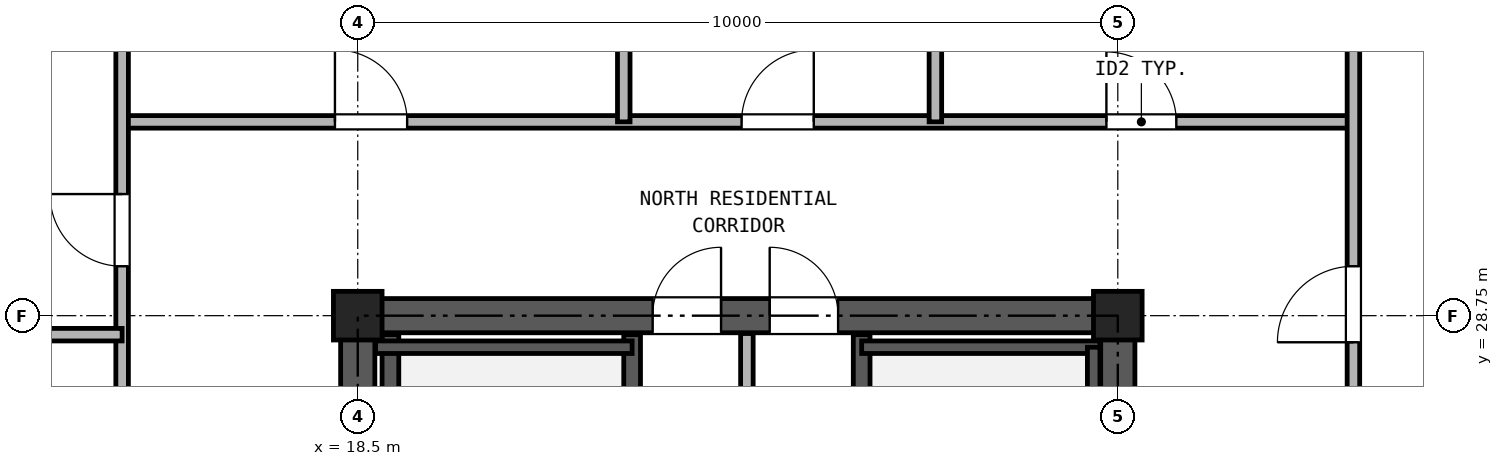
"""IFC4 building model, lengths in metres.
Left out: names, types, materials, properties, quantities, classifications, styles, units other than length and angle.
Written with IfcOpenShell. Run it as: python <this file> out.ifc"""

import sys

from ifc_helpers import new_model, si_unit, direction, frame, frame_2d, origin, origin_2d, place, context, subcontext, project, spatial, rectangle, hollow_rectangle, extrude, source, transform, mapped, element, fill, save


model = new_model("IFC4")
c1 = context("Model", 3, precision=1e-05, world=origin(), true_north=direction((0.0, 1.0)))
c2 = subcontext(c1, "Body", "Model", "MODEL_VIEW")
j1 = project(units=[si_unit("LENGTHUNIT", "METRE"), si_unit("PLANEANGLEUNIT", "RADIAN")], contexts=[c1])
p1 = place(None, origin())
s1 = spatial("IfcSite", under=j1, at=p1, CompositionType="ELEMENT")
p2 = place(p1, origin())
s2 = spatial("IfcBuilding", under=s1, at=p2, CompositionType="ELEMENT")
p3 = place(p2, frame((0.0, 0.0, 175.3)))
s3 = spatial("IfcBuildingStorey", under=s2, at=p3, CompositionType="ELEMENT", Elevation=175.3)
m1 = source(origin(), c2, "Body", "SweptSolid", [
    extrude(hollow_rectangle(XDim=0.64, YDim=0.64, WallThickness=0.035, at=origin_2d()), origin(), (0.0, 0.0, 1.0), 2.95),
])
for number, where, z_axis, x_axis in (
    (1, (18.5, 28.75, 0.0), (0.0, 0.0, 1.0), (1.0, 0.0, 0.0)),
    (2, (28.5, 28.75, 0.0), (0.0, 0.0, 1.0), (1.0, 0.0, 0.0)),
):
    element("IfcColumn", number, at=place(p3, frame(where, z_axis=z_axis, x_axis=x_axis)), inside=s3, PredefinedType="COLUMN", context=c2, shape_type="MappedRepresentation", body=[
        mapped(m1, transform((0.0, 0.0, 0.0), x_axis=(1.0, 0.0, 0.0), y_axis=(0.0, 1.0, 0.0), z_axis=(0.0, 0.0, 1.0), scale=1.0)),
    ])
p4 = place(p3, frame((18.275, 28.75, 0.0), z_axis=(0.0, 0.0, 1.0), x_axis=(1.0, 0.0, 0.0)))
e3 = element("IfcWall", 3, at=p4, inside=s3, PredefinedType="SHEAR", context=c2, shape_type="SweptSolid", body=[
    extrude(rectangle(XDim=10.45, YDim=0.45, at=frame_2d((5.225, 0.0))), origin(), (0.0, 0.0, 1.0), 2.95),
])
p5 = place(p4, frame((4.105, 0.0, 0.0)))
e4 = element("IfcOpeningElement", 4, at=p5, cuts=e3, PredefinedType="OPENING", context=c2, shape_type="SweptSolid", body=[
    extrude(rectangle(XDim=0.9, YDim=2.05, at=frame_2d((0.45, 1.025))), frame((0.0, 0.235, 0.0), z_axis=(0.0, -1.0, 0.0), x_axis=(1.0, 0.0, 0.0)), (0.0, 0.0, 1.0), 0.47),
])
p6 = place(p4, frame((5.645, 0.0, 0.0)))
e5 = element("IfcOpeningElement", 5, at=p6, cuts=e3, PredefinedType="OPENING", context=c2, shape_type="SweptSolid", body=[
    extrude(rectangle(XDim=0.9, YDim=2.05, at=frame_2d((0.45, 1.025))), frame((0.0, 0.235, 0.0), z_axis=(0.0, -1.0, 0.0), x_axis=(1.0, 0.0, 0.0)), (0.0, 0.0, 1.0), 0.47),
])
p7 = place(p3, frame((18.5, 11.725, 0.0), z_axis=(0.0, 0.0, 1.0), x_axis=(0.0, 1.0, 0.0)))
e6 = element("IfcWall", 6, at=p7, inside=s3, PredefinedType="SHEAR", context=c2, shape_type="SweptSolid", body=[
    extrude(rectangle(XDim=16.8, YDim=0.45, at=frame_2d((8.4, 0.0))), origin(), (0.0, 0.0, 1.0), 2.95),
])
p8 = place(p7, frame((7.425, 0.0, 0.0)))
e7 = element("IfcOpeningElement", 7, at=p8, cuts=e6, PredefinedType="OPENING", context=c2, shape_type="SweptSolid", body=[
    extrude(rectangle(XDim=1.15, YDim=2.2, at=frame_2d((0.575, 1.1))), frame((0.0, 0.235, 0.0), z_axis=(0.0, -1.0, 0.0), x_axis=(1.0, 0.0, 0.0)), (0.0, 0.0, 1.0), 0.47),
])
p9 = place(p3, frame((28.5, 11.725, 0.0), z_axis=(0.0, 0.0, 1.0), x_axis=(0.0, 1.0, 0.0)))
e8 = element("IfcWall", 8, at=p9, inside=s3, PredefinedType="SHEAR", context=c2, shape_type="SweptSolid", body=[
    extrude(rectangle(XDim=16.8, YDim=0.45, at=frame_2d((8.4, 0.0))), origin(), (0.0, 0.0, 1.0), 2.95),
])
p10 = place(p9, frame((7.425, 0.0, 0.0)))
e9 = element("IfcOpeningElement", 9, at=p10, cuts=e8, PredefinedType="OPENING", context=c2, shape_type="SweptSolid", body=[
    extrude(rectangle(XDim=1.15, YDim=2.2, at=frame_2d((0.575, 1.1))), frame((0.0, 0.235, 0.0), z_axis=(0.0, -1.0, 0.0), x_axis=(1.0, 0.0, 0.0)), (0.0, 0.0, 1.0), 0.47),
])
for number, where, z_axis, x_axis in (
    (10, (18.93, 21.39, 0.0), (0.0, 0.0, 1.0), (0.0, 1.0, 0.0)),
    (11, (22.11, 21.39, 0.0), (0.0, 0.0, 1.0), (0.0, 1.0, 0.0)),
    (12, (25.13, 21.39, 0.0), (0.0, 0.0, 1.0), (0.0, 1.0, 0.0)),
):
    element("IfcWall", number, at=place(p3, frame(where, z_axis=z_axis, x_axis=x_axis)), inside=s3, PredefinedType="SOLIDWALL", context=c2, shape_type="SweptSolid", body=[
        extrude(rectangle(XDim=7.11, YDim=0.22, at=frame_2d((3.555, 0.0))), origin(), (0.0, 0.0, 1.0), 2.95),
    ])
p11 = place(p3, frame((18.735, 28.335, 0.0), z_axis=(0.0, 0.0, 1.0), x_axis=(1.0, 0.0, 0.0)))
e13 = element("IfcWall", 13, at=p11, inside=s3, PredefinedType="PARTITIONING", context=c2, shape_type="SweptSolid", body=[
    extrude(rectangle(XDim=3.375, YDim=0.165, at=frame_2d((1.688, 0.0))), origin(), (0.0, 0.0, 1.0), 2.95),
])
p12 = place(p3, frame((25.13, 28.335, 0.0), z_axis=(0.0, 0.0, 1.0), x_axis=(1.0, 0.0, 0.0)))
e14 = element("IfcWall", 14, at=p12, inside=s3, PredefinedType="PARTITIONING", context=c2, shape_type="SweptSolid", body=[
    extrude(rectangle(XDim=3.135, YDim=0.165, at=frame_2d((1.567, 0.0))), origin(), (0.0, 0.0, 1.0), 2.95),
])
p13 = place(p3, frame((28.183, 21.39, 0.0), z_axis=(0.0, 0.0, 1.0), x_axis=(0.0, 1.0, 0.0)))
e15 = element("IfcWall", 15, at=p13, inside=s3, PredefinedType="PARTITIONING", context=c2, shape_type="SweptSolid", body=[
    extrude(rectangle(XDim=6.945, YDim=0.165, at=frame_2d((3.473, 0.0))), origin(), (0.0, 0.0, 1.0), 2.95),
])
p14 = place(p3, frame((23.62, 24.4, 0.0), z_axis=(0.0, 0.0, 1.0), x_axis=(0.0, 1.0, 0.0)))
e16 = element("IfcWall", 16, at=p14, inside=s3, PredefinedType="PARTITIONING", context=c2, shape_type="SweptSolid", body=[
    extrude(rectangle(XDim=4.115, YDim=0.165, at=frame_2d((2.058, 0.0))), origin(), (0.0, 0.0, 1.0), 2.95),
])
p15 = place(p3, frame((15.4, 31.3, 0.0), z_axis=(0.0, 0.0, 1.0), x_axis=(1.0, 0.0, 0.0)))
e17 = element("IfcWall", 17, at=p15, inside=s3, PredefinedType="PARTITIONING", context=c2, shape_type="SweptSolid", body=[
    extrude(rectangle(XDim=16.2, YDim=0.165, at=frame_2d((8.1, 0.0))), origin(), (0.0, 0.0, 1.0), 2.95),
])
p16 = place(p15, frame((2.8, 0.0, 0.0)))
e18 = element("IfcOpeningElement", 18, at=p16, cuts=e17, PredefinedType="OPENING", context=c2, shape_type="SweptSolid", body=[
    extrude(rectangle(XDim=0.95, YDim=2.15, at=frame_2d((0.475, 1.075))), frame((0.0, 0.093, 0.0), z_axis=(0.0, -1.0, 0.0), x_axis=(1.0, 0.0, 0.0)), (0.0, 0.0, 1.0), 0.185),
])
p17 = place(p15, frame((8.15, 0.0, 0.0)))
e19 = element("IfcOpeningElement", 19, at=p17, cuts=e17, PredefinedType="OPENING", context=c2, shape_type="SweptSolid", body=[
    extrude(rectangle(XDim=0.95, YDim=2.15, at=frame_2d((0.475, 1.075))), frame((0.0, 0.093, 0.0), z_axis=(0.0, -1.0, 0.0), x_axis=(1.0, 0.0, 0.0)), (0.0, 0.0, 1.0), 0.185),
])
p18 = place(p15, frame((12.95, 0.0, 0.0)))
e20 = element("IfcOpeningElement", 20, at=p18, cuts=e17, PredefinedType="OPENING", context=c2, shape_type="SweptSolid", body=[
    extrude(rectangle(XDim=0.92, YDim=2.1, at=frame_2d((0.46, 1.05))), frame((0.0, 0.093, 0.0), z_axis=(0.0, -1.0, 0.0), x_axis=(1.0, 0.0, 0.0)), (0.0, 0.0, 1.0), 0.185),
])
p19 = place(p3, frame((15.4, 10.7, 0.0), z_axis=(0.0, 0.0, 1.0), x_axis=(0.0, 1.0, 0.0)))
e21 = element("IfcWall", 21, at=p19, inside=s3, PredefinedType="PARTITIONING", context=c2, shape_type="SweptSolid", body=[
    extrude(rectangle(XDim=24.44, YDim=0.165, at=frame_2d((12.22, 0.0))), origin(), (0.0, 0.0, 1.0), 2.95),
])
p20 = place(p19, frame((4.9, 0.0, 0.0)))
e22 = element("IfcOpeningElement", 22, at=p20, cuts=e21, PredefinedType="OPENING", context=c2, shape_type="SweptSolid", body=[
    extrude(rectangle(XDim=0.95, YDim=2.15, at=frame_2d((0.475, 1.075))), frame((0.0, 0.093, 0.0), z_axis=(0.0, -1.0, 0.0), x_axis=(1.0, 0.0, 0.0)), (0.0, 0.0, 1.0), 0.185),
])
p21 = place(p19, frame((13.8, 0.0, 0.0)))
e23 = element("IfcOpeningElement", 23, at=p21, cuts=e21, PredefinedType="OPENING", context=c2, shape_type="SweptSolid", body=[
    extrude(rectangle(XDim=0.95, YDim=2.15, at=frame_2d((0.475, 1.075))), frame((0.0, 0.093, 0.0), z_axis=(0.0, -1.0, 0.0), x_axis=(1.0, 0.0, 0.0)), (0.0, 0.0, 1.0), 0.185),
])
p22 = place(p19, frame((18.7, 0.0, 0.0)))
e24 = element("IfcOpeningElement", 24, at=p22, cuts=e21, PredefinedType="OPENING", context=c2, shape_type="SweptSolid", body=[
    extrude(rectangle(XDim=0.95, YDim=2.15, at=frame_2d((0.475, 1.075))), frame((0.0, 0.093, 0.0), z_axis=(0.0, -1.0, 0.0), x_axis=(1.0, 0.0, 0.0)), (0.0, 0.0, 1.0), 0.185),
])
p23 = place(p3, frame((31.6, 10.7, 0.0), z_axis=(0.0, 0.0, 1.0), x_axis=(0.0, 1.0, 0.0)))
e25 = element("IfcWall", 25, at=p23, inside=s3, PredefinedType="PARTITIONING", context=c2, shape_type="SweptSolid", body=[
    extrude(rectangle(XDim=24.44, YDim=0.165, at=frame_2d((12.22, 0.0))), origin(), (0.0, 0.0, 1.0), 2.95),
])
p24 = place(p23, frame((3.25, 0.0, 0.0)))
e26 = element("IfcOpeningElement", 26, at=p24, cuts=e25, PredefinedType="OPENING", context=c2, shape_type="SweptSolid", body=[
    extrude(rectangle(XDim=1.0, YDim=2.15, at=frame_2d((0.5, 1.075))), frame((0.0, 0.093, 0.0), z_axis=(0.0, -1.0, 0.0), x_axis=(1.0, 0.0, 0.0)), (0.0, 0.0, 1.0), 0.185),
])
p25 = place(p23, frame((11.15, 0.0, 0.0)))
e27 = element("IfcOpeningElement", 27, at=p25, cuts=e25, PredefinedType="OPENING", context=c2, shape_type="SweptSolid", body=[
    extrude(rectangle(XDim=1.0, YDim=2.15, at=frame_2d((0.5, 1.075))), frame((0.0, 0.093, 0.0), z_axis=(0.0, -1.0, 0.0), x_axis=(1.0, 0.0, 0.0)), (0.0, 0.0, 1.0), 0.185),
])
p26 = place(p23, frame((17.7, 0.0, 0.0)))
e28 = element("IfcOpeningElement", 28, at=p26, cuts=e25, PredefinedType="OPENING", context=c2, shape_type="SweptSolid", body=[
    extrude(rectangle(XDim=1.0, YDim=2.15, at=frame_2d((0.5, 1.075))), frame((0.0, 0.093, 0.0), z_axis=(0.0, -1.0, 0.0), x_axis=(1.0, 0.0, 0.0)), (0.0, 0.0, 1.0), 0.185),
])
p27 = place(p3, frame((0.16, 28.5, 0.0), z_axis=(0.0, 0.0, 1.0), x_axis=(1.0, 0.0, 0.0)))
e29 = element("IfcWall", 29, at=p27, inside=s3, PredefinedType="PARTITIONING", context=c2, shape_type="SweptSolid", body=[
    extrude(rectangle(XDim=15.24, YDim=0.165, at=frame_2d((7.62, 0.0))), origin(), (0.0, 0.0, 1.0), 2.323),
])
for number, where, z_axis, x_axis in (
    (30, (22.0, 31.3, 0.0), (0.0, 0.0, 1.0), (0.0, 1.0, 0.0)),
    (31, (26.1, 31.3, 0.0), (0.0, 0.0, 1.0), (0.0, 1.0, 0.0)),
):
    element("IfcWall", number, at=place(p3, frame(where, z_axis=z_axis, x_axis=x_axis)), inside=s3, PredefinedType="PARTITIONING", context=c2, shape_type="SweptSolid", body=[
        extrude(rectangle(XDim=3.84, YDim=0.165, at=frame_2d((1.92, 0.0))), origin(), (0.0, 0.0, 1.0), 2.95),
    ])
p28 = place(p5, origin())
e32 = element("IfcDoor", 32, at=p28, inside=s3, OperationType="SINGLE_SWING_RIGHT", PredefinedType="DOOR", context=c2, shape_type="SweptSolid", body=[
    extrude(rectangle(XDim=0.9, YDim=2.05, at=frame_2d((0.45, 1.025))), frame((0.0, 0.025, 0.0), z_axis=(0.0, -1.0, 0.0), x_axis=(1.0, 0.0, 0.0)), (0.0, 0.0, 1.0), 0.05),
])
fill(e4, e32)
p29 = place(p6, origin())
e33 = element("IfcDoor", 33, at=p29, inside=s3, OperationType="SINGLE_SWING_LEFT", PredefinedType="DOOR", context=c2, shape_type="SweptSolid", body=[
    extrude(rectangle(XDim=0.9, YDim=2.05, at=frame_2d((0.45, 1.025))), frame((0.0, 0.025, 0.0), z_axis=(0.0, -1.0, 0.0), x_axis=(1.0, 0.0, 0.0)), (0.0, 0.0, 1.0), 0.05),
])
fill(e5, e33)
p30 = place(p22, frame((0.95, 0.0, 0.0), z_axis=(0.0, 0.0, 1.0), x_axis=(-1.0, 0.0, 0.0)))
e34 = element("IfcDoor", 34, at=p30, inside=s3, OperationType="SINGLE_SWING_RIGHT", PredefinedType="DOOR", context=c2, shape_type="SweptSolid", body=[
    extrude(rectangle(XDim=0.95, YDim=2.15, at=frame_2d((0.475, 1.075))), frame((0.0, 0.025, 0.0), z_axis=(0.0, -1.0, 0.0), x_axis=(1.0, 0.0, 0.0)), (0.0, 0.0, 1.0), 0.05),
])
fill(e24, e34)
p31 = place(p26, frame((1.0, 0.0, 0.0), z_axis=(0.0, 0.0, 1.0), x_axis=(-1.0, 0.0, 0.0)))
e35 = element("IfcDoor", 35, at=p31, inside=s3, OperationType="SINGLE_SWING_LEFT", PredefinedType="DOOR", context=c2, shape_type="SweptSolid", body=[
    extrude(rectangle(XDim=1.0, YDim=2.15, at=frame_2d((0.5, 1.075))), frame((0.0, 0.025, 0.0), z_axis=(0.0, -1.0, 0.0), x_axis=(1.0, 0.0, 0.0)), (0.0, 0.0, 1.0), 0.05),
])
fill(e28, e35)
p32 = place(p16, origin())
e36 = element("IfcDoor", 36, at=p32, inside=s3, OperationType="SINGLE_SWING_LEFT", PredefinedType="DOOR", context=c2, shape_type="SweptSolid", body=[
    extrude(rectangle(XDim=0.95, YDim=2.15, at=frame_2d((0.475, 1.075))), frame((0.0, 0.025, 0.0), z_axis=(0.0, -1.0, 0.0), x_axis=(1.0, 0.0, 0.0)), (0.0, 0.0, 1.0), 0.05),
])
fill(e18, e36)
p33 = place(p17, origin())
e37 = element("IfcDoor", 37, at=p33, inside=s3, OperationType="SINGLE_SWING_RIGHT", PredefinedType="DOOR", context=c2, shape_type="SweptSolid", body=[
    extrude(rectangle(XDim=0.95, YDim=2.15, at=frame_2d((0.475, 1.075))), frame((0.0, 0.025, 0.0), z_axis=(0.0, -1.0, 0.0), x_axis=(1.0, 0.0, 0.0)), (0.0, 0.0, 1.0), 0.05),
])
fill(e19, e37)
p34 = place(p18, origin())
e38 = element("IfcDoor", 38, at=p34, inside=s3, OperationType="SINGLE_SWING_LEFT", PredefinedType="DOOR", context=c2, shape_type="SweptSolid", body=[
    extrude(rectangle(XDim=0.92, YDim=2.1, at=frame_2d((0.46, 1.05))), frame((0.0, 0.025, 0.0), z_axis=(0.0, -1.0, 0.0), x_axis=(1.0, 0.0, 0.0)), (0.0, 0.0, 1.0), 0.05),
])
fill(e20, e38)
save(model, sys.argv[1])
